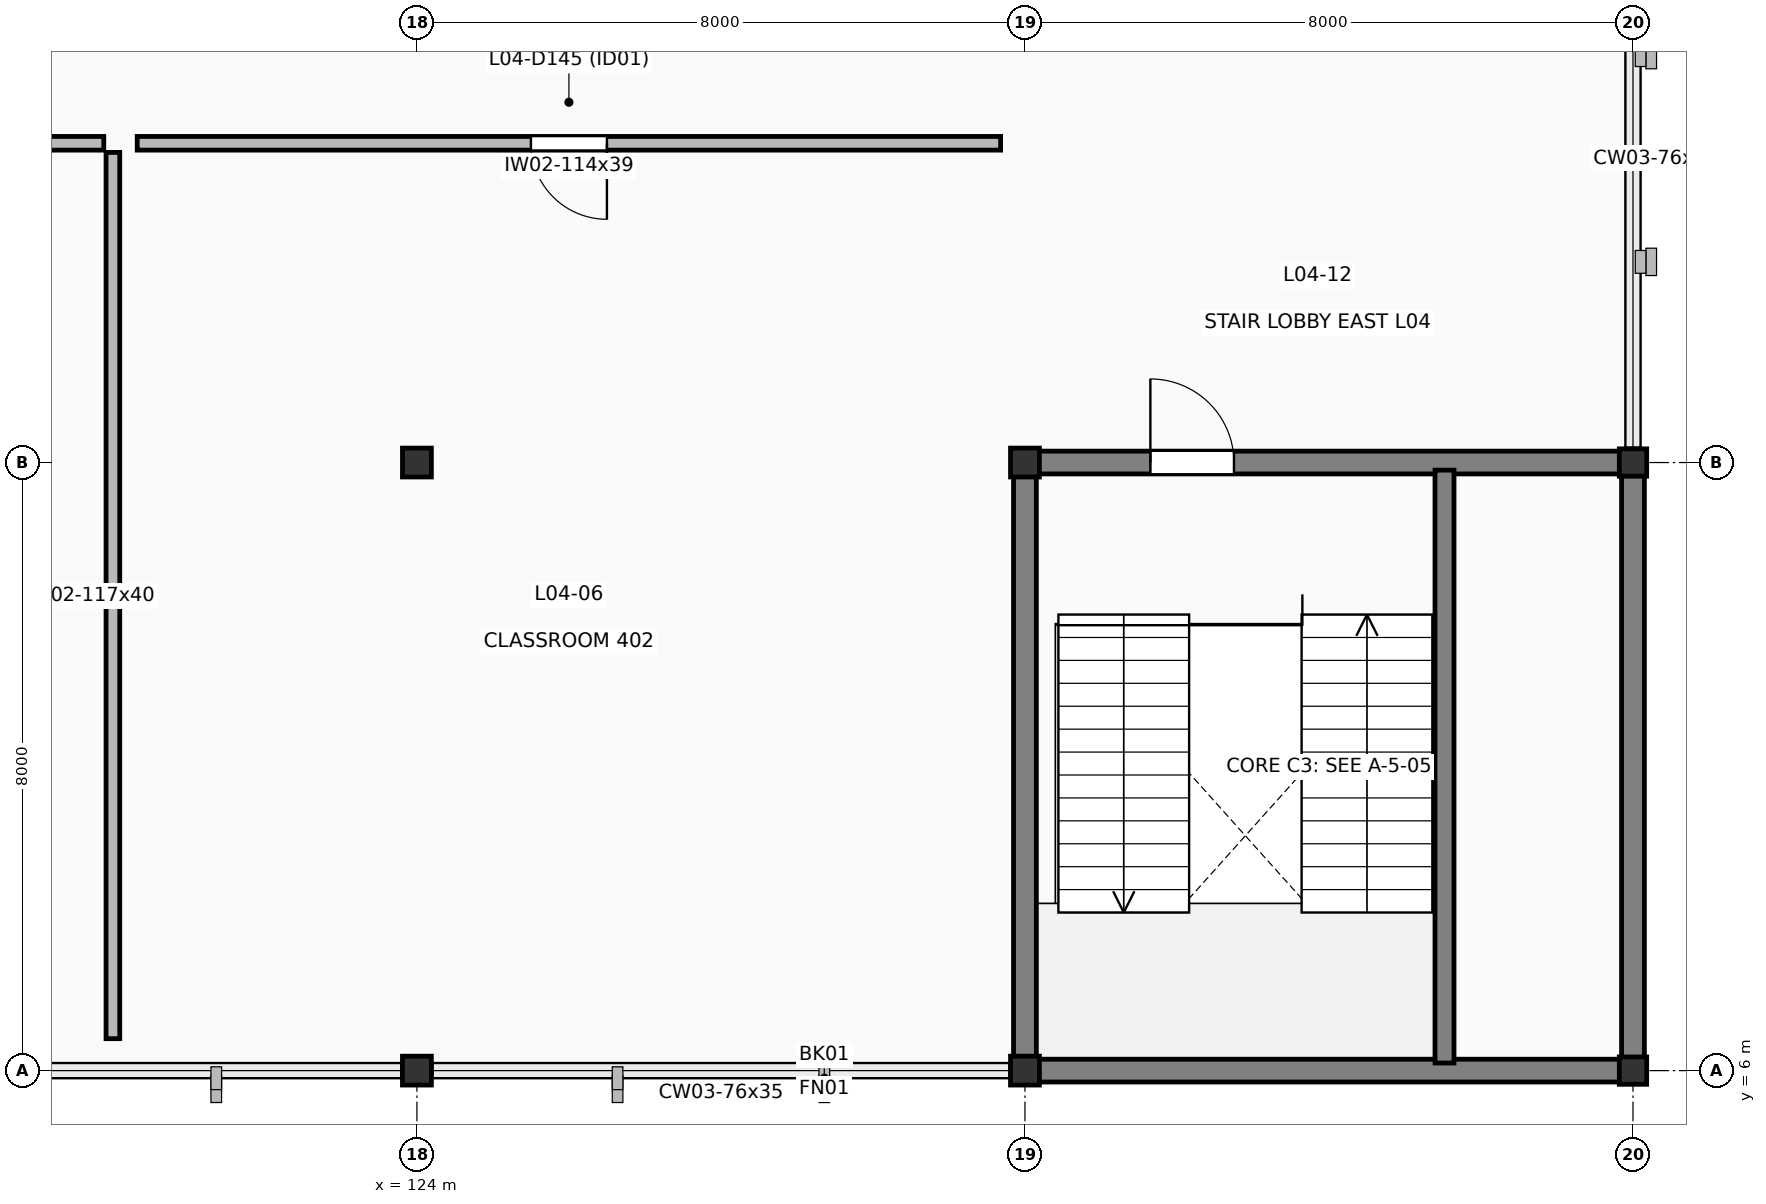
"""IFC4 building model, lengths in metres.
Left out: names, types, materials, properties, quantities, classifications, styles, units other than length and angle.
Written with IfcOpenShell. Run it as: python <this file> out.ifc"""

import sys

from ifc_helpers import new_model, si_unit, direction, frame, frame_2d, origin, origin_2d, place, context, subcontext, project, spatial, rectangle, extrude, element, fill, save


model = new_model("IFC4")
c1 = context("Model", 3, precision=1e-05, world=origin(), true_north=direction((0.0, 1.0)))
c2 = subcontext(c1, "Body", "Model", "MODEL_VIEW")
j1 = project(units=[si_unit("LENGTHUNIT", "METRE"), si_unit("PLANEANGLEUNIT", "RADIAN")], contexts=[c1])
p1 = place(None, origin())
s1 = spatial("IfcSite", under=j1, at=p1, CompositionType="ELEMENT")
p2 = place(p1, origin())
s2 = spatial("IfcBuilding", under=s1, at=p2, CompositionType="ELEMENT")
p3 = place(p2, frame((0.0, 0.0, 18.0)))
s3 = spatial("IfcBuildingStorey", under=s2, at=p3, CompositionType="ELEMENT", Elevation=18.0)
for number, where, z_axis, x_axis in (
    (1, (124.0, 6.0, 0.0), (0.0, 0.0, 1.0), (1.0, 0.0, 0.0)),
    (2, (124.0, 14.0, 0.0), (0.0, 0.0, 1.0), (1.0, 0.0, 0.0)),
    (3, (132.0, 6.0, 0.0), (0.0, 0.0, 1.0), (1.0, 0.0, 0.0)),
    (4, (132.0, 14.0, 0.0), (0.0, 0.0, 1.0), (1.0, 0.0, 0.0)),
):
    element("IfcColumn", number, at=place(p3, frame(where, z_axis=z_axis, x_axis=x_axis)), inside=s3, PredefinedType="COLUMN", context=c2, shape_type="SweptSolid", body=[
        extrude(rectangle(XDim=0.38, YDim=0.38, at=origin_2d()), origin(), (0.0, 0.0, 1.0), 4.2),
    ])
for number, where, z_axis, x_axis in (
    (5, (140.0, 6.0, 0.0), (0.0, 0.0, 1.0), (1.0, 0.0, 0.0)),
    (6, (140.0, 14.0, 0.0), (0.0, 0.0, 1.0), (1.0, 0.0, 0.0)),
):
    element("IfcColumn", number, at=place(p3, frame(where, z_axis=z_axis, x_axis=x_axis)), inside=s3, PredefinedType="COLUMN", context=c2, shape_type="SweptSolid", body=[
        extrude(rectangle(XDim=0.36, YDim=0.36, at=origin_2d()), origin(), (0.0, 0.0, 1.0), 4.2),
    ])
for number, where, z_axis, x_axis in (
    (7, (140.0, 6.0, 0.0), (0.0, 0.0, 1.0), (-1.0, 0.0, 0.0)),
    (8, (140.0, 14.0, 0.0), (0.0, 0.0, 1.0), (0.0, -1.0, 0.0)),
):
    element("IfcWall", number, at=place(p3, frame(where, z_axis=z_axis, x_axis=x_axis)), inside=s3, PredefinedType="SOLIDWALL", context=c2, shape_type="SweptSolid", body=[
        extrude(rectangle(XDim=8.0, YDim=0.3, at=frame_2d((4.0, 0.0))), origin(), (0.0, 0.0, 1.0), 4.2),
    ])
p4 = place(p3, frame((132.0, 6.0, 0.0), z_axis=(0.0, 0.0, 1.0), x_axis=(0.0, 1.0, 0.0)))
e9 = element("IfcWall", 9, at=p4, inside=s3, PredefinedType="SHEAR", context=c2, shape_type="SweptSolid", body=[
    extrude(rectangle(XDim=8.0, YDim=0.3, at=frame_2d((4.0, 0.0))), origin(), (0.0, 0.0, 1.0), 4.2),
])
p5 = place(p3, frame((132.0, 14.0, 0.0), z_axis=(0.0, 0.0, 1.0), x_axis=(1.0, 0.0, 0.0)))
e10 = element("IfcWall", 10, at=p5, inside=s3, PredefinedType="SHEAR", context=c2, shape_type="SweptSolid", body=[
    extrude(rectangle(XDim=8.0, YDim=0.3, at=frame_2d((4.0, 0.0))), origin(), (0.0, 0.0, 1.0), 4.2),
])
p6 = place(p5, frame((1.65, 0.0, 0.0)))
e11 = element("IfcOpeningElement", 11, at=p6, cuts=e10, PredefinedType="OPENING", context=c2, shape_type="SweptSolid", body=[
    extrude(rectangle(XDim=1.1, YDim=2.2, at=frame_2d((0.55, 1.1))), frame((0.0, 0.16, 0.0), z_axis=(0.0, -1.0, 0.0), x_axis=(1.0, 0.0, 0.0)), (0.0, 0.0, 1.0), 0.32),
])
p7 = place(p3, frame((137.52, 6.1, 0.0), z_axis=(0.0, 0.0, 1.0), x_axis=(0.0, 1.0, 0.0)))
e12 = element("IfcWall", 12, at=p7, inside=s3, PredefinedType="SHEAR", context=c2, shape_type="SweptSolid", body=[
    extrude(rectangle(XDim=7.8, YDim=0.25, at=frame_2d((3.9, 0.0))), origin(), (0.0, 0.0, 1.0), 4.2),
])
p8 = place(p3, frame((119.88, 18.2, 0.0), z_axis=(0.0, 0.0, 1.0), x_axis=(-1.0, 0.0, 0.0)))
e13 = element("IfcWall", 13, at=p8, inside=s3, PredefinedType="PARTITIONING", context=c2, shape_type="SweptSolid", body=[
    extrude(rectangle(XDim=11.56, YDim=0.18, at=frame_2d((5.78, 0.0))), origin(), (0.0, 0.0, 1.0), 3.905),
])
p9 = place(p8, frame((5.28, 0.0, 0.0)))
e14 = element("IfcOpeningElement", 14, at=p9, cuts=e13, PredefinedType="OPENING", context=c2, shape_type="SweptSolid", body=[
    extrude(rectangle(XDim=1.0, YDim=2.15, at=frame_2d((0.5, 1.075))), frame((0.0, 0.1, 0.0), z_axis=(0.0, -1.0, 0.0), x_axis=(1.0, 0.0, 0.0)), (0.0, 0.0, 1.0), 0.2),
])
p10 = place(p3, frame((120.0, 6.42, 0.0), z_axis=(0.0, 0.0, 1.0), x_axis=(0.0, 1.0, 0.0)))
e15 = element("IfcWall", 15, at=p10, inside=s3, PredefinedType="PARTITIONING", context=c2, shape_type="SweptSolid", body=[
    extrude(rectangle(XDim=11.66, YDim=0.18, at=frame_2d((5.83, 0.0))), origin(), (0.0, 0.0, 1.0), 4.0),
])
p11 = place(p3, frame((131.68, 18.2, 0.0), z_axis=(0.0, 0.0, 1.0), x_axis=(-1.0, 0.0, 0.0)))
e16 = element("IfcWall", 16, at=p11, inside=s3, PredefinedType="PARTITIONING", context=c2, shape_type="SweptSolid", body=[
    extrude(rectangle(XDim=11.36, YDim=0.18, at=frame_2d((5.68, 0.0))), origin(), (0.0, 0.0, 1.0), 3.905),
])
p12 = place(p11, frame((5.18, 0.0, 0.0)))
e17 = element("IfcOpeningElement", 17, at=p12, cuts=e16, PredefinedType="OPENING", context=c2, shape_type="SweptSolid", body=[
    extrude(rectangle(XDim=1.0, YDim=2.15, at=frame_2d((0.5, 1.075))), frame((0.0, 0.1, 0.0), z_axis=(0.0, -1.0, 0.0), x_axis=(1.0, 0.0, 0.0)), (0.0, 0.0, 1.0), 0.2),
])
p13 = place(p6, origin())
e18 = element("IfcDoor", 18, at=p13, inside=s3, OperationType="SINGLE_SWING_LEFT", PredefinedType="DOOR", context=c2, shape_type="SweptSolid", body=[
    extrude(rectangle(XDim=1.1, YDim=2.2, at=frame_2d((0.55, 1.1))), frame((0.0, 0.025, 0.0), z_axis=(0.0, -1.0, 0.0), x_axis=(1.0, 0.0, 0.0)), (0.0, 0.0, 1.0), 0.05),
])
fill(e11, e18)
p14 = place(p12, origin())
e19 = element("IfcDoor", 19, at=p14, inside=s3, OperationType="SINGLE_SWING_LEFT", PredefinedType="DOOR", context=c2, shape_type="SweptSolid", body=[
    extrude(rectangle(XDim=1.0, YDim=2.15, at=frame_2d((0.5, 1.075))), frame((0.0, 0.025, 0.0), z_axis=(0.0, -1.0, 0.0), x_axis=(1.0, 0.0, 0.0)), (0.0, 0.0, 1.0), 0.05),
])
fill(e17, e19)
save(model, sys.argv[1])
